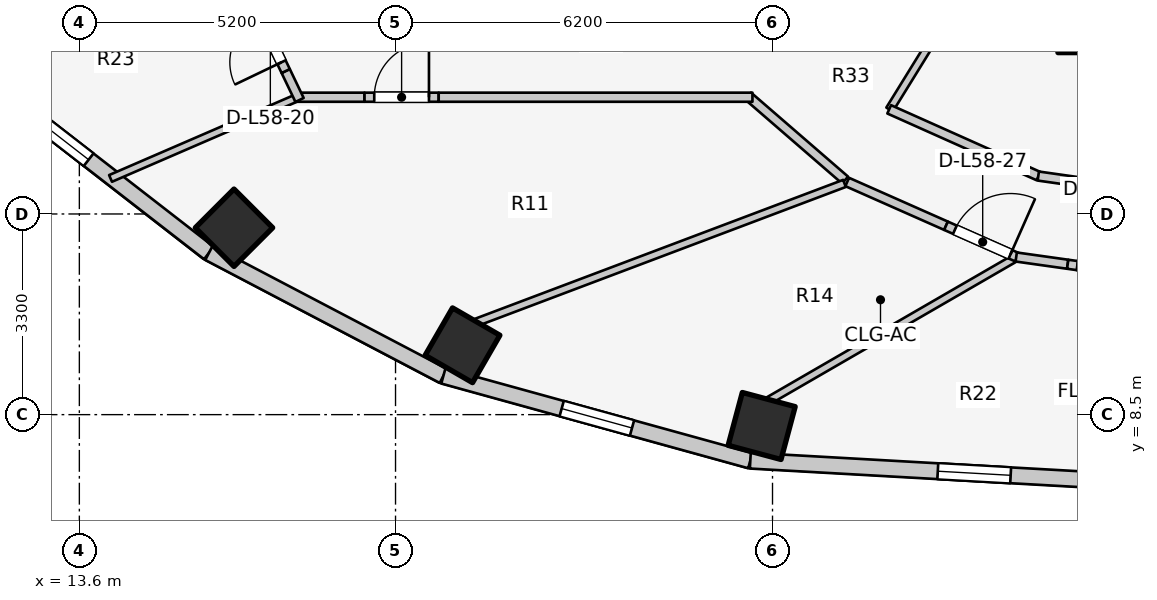
"""IFC4 building model, lengths in metres.
Left out: names, types, materials, properties, quantities, classifications, styles, units other than length and angle.
Written with IfcOpenShell. Run it as: python <this file> out.ifc"""

import sys

from ifc_helpers import new_model, si_unit, direction, frame, frame_2d, origin, origin_2d, place, context, subcontext, project, spatial, rectangle, extrude, element, fill, save


model = new_model("IFC4")
c1 = context("Model", 3, precision=1e-05, world=origin(), true_north=direction((0.0, 1.0)))
c2 = subcontext(c1, "Body", "Model", "MODEL_VIEW")
j1 = project(units=[si_unit("LENGTHUNIT", "METRE"), si_unit("PLANEANGLEUNIT", "RADIAN")], contexts=[c1])
p1 = place(None, origin())
s1 = spatial("IfcSite", under=j1, at=p1, CompositionType="ELEMENT")
p2 = place(p1, origin())
s2 = spatial("IfcBuilding", under=s1, at=p2, CompositionType="ELEMENT")
p3 = place(p2, frame((0.0, 0.0, 190.1)))
s3 = spatial("IfcBuildingStorey", under=s2, at=p3, CompositionType="ELEMENT", Elevation=190.1)
for number, where, z_axis, x_axis in (
    (1, (16.143, 11.573, 0.0), (0.0, 0.0, 1.0), (-0.707, -0.707, 0.0)),
    (2, (19.902, 9.641, 0.0), (0.0, 0.0, 1.0), (-0.5, -0.866, 0.0)),
    (3, (24.822, 8.313, 0.0), (0.0, 0.0, 1.0), (-0.259, -0.966, 0.0)),
):
    element("IfcColumn", number, at=place(p3, frame(where, z_axis=z_axis, x_axis=x_axis)), inside=s3, PredefinedType="COLUMN", context=c2, shape_type="SweptSolid", body=[
        extrude(rectangle(XDim=0.9, YDim=0.9, at=origin_2d()), origin(), (0.0, 0.0, 1.0), 3.1),
    ])
p4 = place(p3, frame((12.381, 13.757, 0.0), z_axis=(0.0, 0.0, 1.0), x_axis=(0.790185650662, -0.612867552973, 0.0)))
e4 = element("IfcWall", 4, at=p4, inside=s3, PredefinedType="STANDARD", context=c2, shape_type="SweptSolid", body=[
    extrude(rectangle(XDim=4.239, YDim=0.26, at=frame_2d((2.12, 0.0))), origin(), (0.0, 0.0, 1.0), 1.22),
])
p5 = place(p4, frame((0.536, 0.0, 0.15)))
e5 = element("IfcOpeningElement", 5, at=p5, cuts=e4, PredefinedType="OPENING", context=c2, shape_type="SweptSolid", body=[
    extrude(rectangle(XDim=1.2, YDim=0.9, at=frame_2d((0.6, 0.45))), frame((0.0, 0.14, 0.0), z_axis=(0.0, -1.0, 0.0), x_axis=(1.0, 0.0, 0.0)), (0.0, 0.0, 1.0), 0.28),
])
p6 = place(p3, frame((15.731, 11.158, 0.0), z_axis=(0.0, 0.0, 1.0), x_axis=(0.885660265226, -0.464333818065, 0.0)))
e6 = element("IfcWall", 6, at=p6, inside=s3, PredefinedType="STANDARD", context=c2, shape_type="SweptSolid", body=[
    extrude(rectangle(XDim=4.354, YDim=0.26, at=frame_2d((2.177, 0.0))), origin(), (0.0, 0.0, 1.0), 1.22),
])
p7 = place(p3, frame((19.587, 9.137, 0.0), z_axis=(0.0, 0.0, 1.0), x_axis=(0.963953455704, -0.26607092144, 0.0)))
e7 = element("IfcWall", 7, at=p7, inside=s3, PredefinedType="STANDARD", context=c2, shape_type="SweptSolid", body=[
    extrude(rectangle(XDim=5.237, YDim=0.26, at=frame_2d((2.618, 0.0))), origin(), (0.0, 0.0, 1.0), 1.22),
])
p8 = place(p7, frame((2.018, 0.0, 0.15)))
e8 = element("IfcOpeningElement", 8, at=p8, cuts=e7, PredefinedType="OPENING", context=c2, shape_type="SweptSolid", body=[
    extrude(rectangle(XDim=1.2, YDim=0.9, at=frame_2d((0.6, 0.45))), frame((0.0, 0.14, 0.0), z_axis=(0.0, -1.0, 0.0), x_axis=(1.0, 0.0, 0.0)), (0.0, 0.0, 1.0), 0.28),
])
p9 = place(p3, frame((24.635, 7.743, 0.0), z_axis=(0.0, 0.0, 1.0), x_axis=(0.998417906562, -0.056228852534, 0.0)))
e9 = element("IfcWall", 9, at=p9, inside=s3, PredefinedType="STANDARD", context=c2, shape_type="SweptSolid", body=[
    extrude(rectangle(XDim=7.377, YDim=0.26, at=frame_2d((3.688, 0.0))), origin(), (0.0, 0.0, 1.0), 1.22),
])
p10 = place(p9, frame((3.088, 0.0, 0.15)))
e10 = element("IfcOpeningElement", 10, at=p10, cuts=e9, PredefinedType="OPENING", context=c2, shape_type="SweptSolid", body=[
    extrude(rectangle(XDim=1.2, YDim=0.9, at=frame_2d((0.6, 0.45))), frame((0.0, 0.14, 0.0), z_axis=(0.0, -1.0, 0.0), x_axis=(1.0, 0.0, 0.0)), (0.0, 0.0, 1.0), 0.28),
])
p11 = place(p3, frame((17.246, 13.74, 0.0), z_axis=(0.0, 0.0, 1.0), x_axis=(-0.917766865873, -0.397119604031, 0.0)))
e11 = element("IfcWall", 11, at=p11, inside=s3, PredefinedType="MOVABLE", context=c2, shape_type="SweptSolid", body=[
    extrude(rectangle(XDim=3.413, YDim=0.12, at=frame_2d((1.707, 0.0))), origin(), (0.0, 0.0, 1.0), 1.22),
])
p12 = place(p3, frame((26.193, 12.358, 0.0), z_axis=(0.0, 0.0, 1.0), x_axis=(-0.756055312247, 0.654507727092, 0.0)))
e12 = element("IfcWall", 12, at=p12, inside=s3, PredefinedType="PARTITIONING", context=c2, shape_type="SweptSolid", body=[
    extrude(rectangle(XDim=2.111, YDim=0.15, at=frame_2d((1.055, 0.0))), origin(), (0.0, 0.0, 1.0), 1.22),
])
p13 = place(p3, frame((17.15, 13.72, 0.0), z_axis=(0.0, 0.0, 1.0), x_axis=(1.0, 0.0, 0.0)))
e13 = element("IfcWall", 13, at=p13, inside=s3, PredefinedType="PARTITIONING", context=c2, shape_type="SweptSolid", body=[
    extrude(rectangle(XDim=1.14, YDim=0.15, at=frame_2d((0.57, 0.0))), origin(), (0.0, 0.0, 1.0), 2.575),
])
p14 = place(p3, frame((18.29, 13.72, 0.0), z_axis=(0.0, 0.0, 1.0), x_axis=(1.0, 0.0, 0.0)))
e14 = element("IfcWall", 14, at=p14, inside=s3, PredefinedType="PARTITIONING", context=c2, shape_type="SweptSolid", body=[
    extrude(rectangle(XDim=1.22, YDim=0.15, at=frame_2d((0.61, 0.0))), origin(), (0.0, 0.0, 1.0), 2.16),
])
p15 = place(p14, frame((0.16, 0.0, 0.0)))
e15 = element("IfcOpeningElement", 15, at=p15, cuts=e14, PredefinedType="OPENING", context=c2, shape_type="SweptSolid", body=[
    extrude(rectangle(XDim=0.9, YDim=2.1, at=frame_2d((0.45, 1.05))), frame((0.0, 0.085, 0.0), z_axis=(0.0, -1.0, 0.0), x_axis=(1.0, 0.0, 0.0)), (0.0, 0.0, 1.0), 0.17),
])
p16 = place(p3, frame((19.51, 13.72, 0.0), z_axis=(0.0, 0.0, 1.0), x_axis=(1.0, 0.0, 0.0)))
e16 = element("IfcWall", 16, at=p16, inside=s3, PredefinedType="PARTITIONING", context=c2, shape_type="SweptSolid", body=[
    extrude(rectangle(XDim=5.16, YDim=0.15, at=frame_2d((2.58, 0.0))), origin(), (0.0, 0.0, 1.0), 1.22),
])
p17 = place(p3, frame((17.222, 13.675, 0.0), z_axis=(0.0, 0.0, 1.0), x_axis=(-0.431782981727, 0.901977525602, 0.0)))
e17 = element("IfcWall", 17, at=p17, inside=s3, PredefinedType="PARTITIONING", context=c2, shape_type="SweptSolid", body=[
    extrude(rectangle(XDim=0.528, YDim=0.15, at=frame_2d((0.264, 0.0))), origin(), (0.0, 0.0, 1.0), 2.575),
])
p18 = place(p3, frame((16.994, 14.151, 0.0), z_axis=(0.0, 0.0, 1.0), x_axis=(-0.431957534962, 0.901893944979, 0.0)))
e18 = element("IfcWall", 18, at=p18, inside=s3, PredefinedType="PARTITIONING", context=c2, shape_type="SweptSolid", body=[
    extrude(rectangle(XDim=1.17, YDim=0.15, at=frame_2d((0.585, 0.0))), origin(), (0.0, 0.0, 1.0), 2.575),
])
p19 = place(p18, frame((0.16, 0.0, 0.0)))
e19 = element("IfcOpeningElement", 19, at=p19, cuts=e18, PredefinedType="OPENING", context=c2, shape_type="SweptSolid", body=[
    extrude(rectangle(XDim=0.85, YDim=2.05, at=frame_2d((0.425, 1.025))), frame((0.0, 0.085, 0.0), z_axis=(0.0, -1.0, 0.0), x_axis=(1.0, 0.0, 0.0)), (0.0, 0.0, 1.0), 0.17),
])
p20 = place(p3, frame((28.45, 15.985, 0.0), z_axis=(0.0, 0.0, 1.0), x_axis=(-0.525627246902, -0.850714991824, 0.0)))
e20 = element("IfcWall", 20, at=p20, inside=s3, PredefinedType="PARTITIONING", context=c2, shape_type="SweptSolid", body=[
    extrude(rectangle(XDim=2.901, YDim=0.125, at=frame_2d((1.451, 0.0))), origin(), (0.0, 0.0, 1.0), 1.22),
])
p21 = place(p3, frame((26.919, 13.521, 0.0), z_axis=(0.0, 0.0, 1.0), x_axis=(0.912888568324, -0.408208845842, 0.0)))
e21 = element("IfcWall", 21, at=p21, inside=s3, PredefinedType="PARTITIONING", context=c2, shape_type="SweptSolid", body=[
    extrude(rectangle(XDim=2.69, YDim=0.15, at=frame_2d((1.345, 0.0))), origin(), (0.0, 0.0, 1.0), 1.22),
])
p22 = place(p3, frame((29.371, 12.424, 0.0), z_axis=(0.0, 0.0, 1.0), x_axis=(0.990066775667, -0.1405979364, 0.0)))
e22 = element("IfcWall", 22, at=p22, inside=s3, PredefinedType="PARTITIONING", context=c2, shape_type="SweptSolid", body=[
    extrude(rectangle(XDim=2.657, YDim=0.15, at=frame_2d((1.328, 0.0))), origin(), (0.0, 0.0, 1.0), 1.22),
])
p23 = place(p3, frame((26.184, 12.302, 0.0), z_axis=(0.0, 0.0, 1.0), x_axis=(-0.935601484289, -0.353057874288, 0.0)))
e23 = element("IfcWall", 23, at=p23, inside=s3, PredefinedType="PARTITIONING", context=c2, shape_type="SweptSolid", body=[
    extrude(rectangle(XDim=6.484, YDim=0.125, at=frame_2d((3.242, 0.0))), origin(), (0.0, 0.0, 1.0), 1.22),
])
p24 = place(p3, frame((28.968, 11.062, 0.0), z_axis=(0.0, 0.0, 1.0), x_axis=(-0.865627016774, -0.500689392568, 0.0)))
e24 = element("IfcWall", 24, at=p24, inside=s3, PredefinedType="PARTITIONING", context=c2, shape_type="SweptSolid", body=[
    extrude(rectangle(XDim=4.662, YDim=0.125, at=frame_2d((2.331, 0.0))), origin(), (0.0, 0.0, 1.0), 1.22),
])
p25 = place(p3, frame((26.228, 12.326, 0.0), z_axis=(0.0, 0.0, 1.0), x_axis=(0.914303617865, -0.405029498135, 0.0)))
e25 = element("IfcWall", 25, at=p25, inside=s3, PredefinedType="PARTITIONING", context=c2, shape_type="SweptSolid", body=[
    extrude(rectangle(XDim=1.778, YDim=0.15, at=frame_2d((0.889, 0.0))), origin(), (0.0, 0.0, 1.0), 1.22),
])
p26 = place(p3, frame((27.853, 11.606, 0.0), z_axis=(0.0, 0.0, 1.0), x_axis=(0.91435342481, -0.40491704649, 0.0)))
e26 = element("IfcWall", 26, at=p26, inside=s3, PredefinedType="PARTITIONING", context=c2, shape_type="SweptSolid", body=[
    extrude(rectangle(XDim=1.28, YDim=0.15, at=frame_2d((0.64, 0.0))), origin(), (0.0, 0.0, 1.0), 2.16),
])
p27 = place(p26, frame((0.16, 0.0, 0.0)))
e27 = element("IfcOpeningElement", 27, at=p27, cuts=e26, PredefinedType="OPENING", context=c2, shape_type="SweptSolid", body=[
    extrude(rectangle(XDim=1.0, YDim=2.1, at=frame_2d((0.5, 1.05))), frame((0.0, 0.085, 0.0), z_axis=(0.0, -1.0, 0.0), x_axis=(1.0, 0.0, 0.0)), (0.0, 0.0, 1.0), 0.17),
])
p28 = place(p3, frame((29.008, 11.092, 0.0), z_axis=(0.0, 0.0, 1.0), x_axis=(0.990238723834, -0.139381741342, 0.0)))
e28 = element("IfcWall", 28, at=p28, inside=s3, PredefinedType="PARTITIONING", context=c2, shape_type="SweptSolid", body=[
    extrude(rectangle(XDim=0.855, YDim=0.15, at=frame_2d((0.427, 0.0))), origin(), (0.0, 0.0, 1.0), 2.575),
])
p29 = place(p3, frame((29.854, 10.973, 0.0), z_axis=(0.0, 0.0, 1.0), x_axis=(0.990254187593, -0.139271834751, 0.0)))
e29 = element("IfcWall", 29, at=p29, inside=s3, PredefinedType="PARTITIONING", context=c2, shape_type="SweptSolid", body=[
    extrude(rectangle(XDim=1.32, YDim=0.15, at=frame_2d((0.66, 0.0))), origin(), (0.0, 0.0, 1.0), 2.575),
])
p30 = place(p29, frame((0.16, 0.0, 0.0)))
e30 = element("IfcOpeningElement", 30, at=p30, cuts=e29, PredefinedType="OPENING", context=c2, shape_type="SweptSolid", body=[
    extrude(rectangle(XDim=1.0, YDim=2.1, at=frame_2d((0.5, 1.05))), frame((0.0, 0.085, 0.0), z_axis=(0.0, -1.0, 0.0), x_axis=(1.0, 0.0, 0.0)), (0.0, 0.0, 1.0), 0.17),
])
p31 = place(p5, origin())
e31 = element("IfcWindow", 31, at=p31, inside=s3, PartitioningType="SINGLE_PANEL", PredefinedType="WINDOW", context=c2, shape_type="SweptSolid", body=[
    extrude(rectangle(XDim=1.2, YDim=0.9, at=frame_2d((0.6, 0.45))), frame((0.0, 0.03, 0.0), z_axis=(0.0, -1.0, 0.0), x_axis=(1.0, 0.0, 0.0)), (0.0, 0.0, 1.0), 0.06),
])
fill(e5, e31)
p32 = place(p8, origin())
e32 = element("IfcWindow", 32, at=p32, inside=s3, PartitioningType="SINGLE_PANEL", PredefinedType="WINDOW", context=c2, shape_type="SweptSolid", body=[
    extrude(rectangle(XDim=1.2, YDim=0.9, at=frame_2d((0.6, 0.45))), frame((0.0, 0.03, 0.0), z_axis=(0.0, -1.0, 0.0), x_axis=(1.0, 0.0, 0.0)), (0.0, 0.0, 1.0), 0.06),
])
fill(e8, e32)
p33 = place(p10, origin())
e33 = element("IfcWindow", 33, at=p33, inside=s3, PartitioningType="SINGLE_PANEL", PredefinedType="WINDOW", context=c2, shape_type="SweptSolid", body=[
    extrude(rectangle(XDim=1.2, YDim=0.9, at=frame_2d((0.6, 0.45))), frame((0.0, 0.03, 0.0), z_axis=(0.0, -1.0, 0.0), x_axis=(1.0, 0.0, 0.0)), (0.0, 0.0, 1.0), 0.06),
])
fill(e10, e33)
p34 = place(p15, origin())
e34 = element("IfcDoor", 34, at=p34, inside=s3, OperationType="SINGLE_SWING_RIGHT", PredefinedType="DOOR", context=c2, shape_type="SweptSolid", body=[
    extrude(rectangle(XDim=0.9, YDim=2.1, at=frame_2d((0.45, 1.05))), frame((0.0, 0.025, 0.0), z_axis=(0.0, -1.0, 0.0), x_axis=(1.0, 0.0, 0.0)), (0.0, 0.0, 1.0), 0.05),
])
fill(e15, e34)
p35 = place(p19, origin())
e35 = element("IfcDoor", 35, at=p35, inside=s3, OperationType="SINGLE_SWING_LEFT", PredefinedType="DOOR", context=c2, shape_type="SweptSolid", body=[
    extrude(rectangle(XDim=0.85, YDim=2.05, at=frame_2d((0.425, 1.025))), frame((0.0, 0.025, 0.0), z_axis=(0.0, -1.0, 0.0), x_axis=(1.0, 0.0, 0.0)), (0.0, 0.0, 1.0), 0.05),
])
fill(e19, e35)
p36 = place(p27, origin())
e36 = element("IfcDoor", 36, at=p36, inside=s3, OperationType="SINGLE_SWING_RIGHT", PredefinedType="DOOR", context=c2, shape_type="SweptSolid", body=[
    extrude(rectangle(XDim=1.0, YDim=2.1, at=frame_2d((0.5, 1.05))), frame((0.0, 0.025, 0.0), z_axis=(0.0, -1.0, 0.0), x_axis=(1.0, 0.0, 0.0)), (0.0, 0.0, 1.0), 0.05),
])
fill(e27, e36)
p37 = place(p30, origin())
e37 = element("IfcDoor", 37, at=p37, inside=s3, OperationType="SINGLE_SWING_LEFT", PredefinedType="DOOR", context=c2, shape_type="SweptSolid", body=[
    extrude(rectangle(XDim=1.0, YDim=2.1, at=frame_2d((0.5, 1.05))), frame((0.0, 0.025, 0.0), z_axis=(0.0, -1.0, 0.0), x_axis=(1.0, 0.0, 0.0)), (0.0, 0.0, 1.0), 0.05),
])
fill(e30, e37)
save(model, sys.argv[1])
